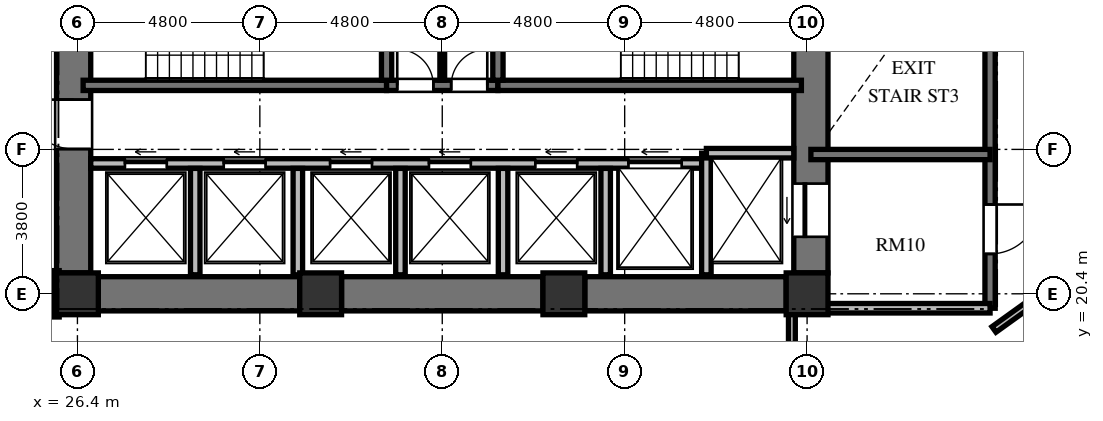
"""IFC4 building model, lengths in metres.
Left out: names, types, materials, properties, quantities, classifications, styles, units other than length and angle.
Written with IfcOpenShell. Run it as: python <this file> out.ifc"""

import sys

from ifc_helpers import new_model, si_unit, direction, frame, frame_2d, origin, origin_2d, place, context, subcontext, project, spatial, rectangle, extrude, element, fill, save


model = new_model("IFC4")
c1 = context("Model", 3, precision=1e-05, world=origin(), true_north=direction((0.0, 1.0)))
c2 = subcontext(c1, "Body", "Model", "MODEL_VIEW")
j1 = project(units=[si_unit("LENGTHUNIT", "METRE"), si_unit("PLANEANGLEUNIT", "RADIAN")], contexts=[c1])
p1 = place(None, origin())
s1 = spatial("IfcSite", under=j1, at=p1, CompositionType="ELEMENT")
p2 = place(p1, origin())
s2 = spatial("IfcBuilding", under=s1, at=p2, CompositionType="ELEMENT")
p3 = place(p2, frame((0.0, 0.0, 61.68)))
s3 = spatial("IfcBuildingStorey", under=s2, at=p3, CompositionType="ELEMENT", Elevation=61.68)
for number, where, z_axis, x_axis in (
    (1, (26.4, 20.4, 0.0), (0.0, 0.0, 1.0), (1.0, 0.0, 0.0)),
    (2, (32.8, 20.4, 0.0), (0.0, 0.0, 1.0), (1.0, 0.0, 0.0)),
    (3, (39.2, 20.4, 0.0), (0.0, 0.0, 1.0), (1.0, 0.0, 0.0)),
    (4, (45.6, 20.4, 0.0), (0.0, 0.0, 1.0), (1.0, 0.0, 0.0)),
):
    element("IfcColumn", number, at=place(p3, frame(where, z_axis=z_axis, x_axis=x_axis)), inside=s3, PredefinedType="COLUMN", context=c2, shape_type="SweptSolid", body=[
        extrude(rectangle(XDim=1.1, YDim=1.1, at=origin_2d()), origin(), (0.0, 0.0, 1.0), 3.648),
    ])
p4 = place(p3, frame((26.3, 20.95, 0.0), z_axis=(0.0, 0.0, 1.0), x_axis=(0.0, 1.0, 0.0)))
e5 = element("IfcWall", 5, at=p4, inside=s3, PredefinedType="SHEAR", context=c2, shape_type="SweptSolid", body=[
    extrude(rectangle(XDim=14.1, YDim=0.9, at=frame_2d((7.05, 0.0))), origin(), (0.0, 0.0, 1.0), 3.648),
])
p5 = place(p4, frame((6.5, 0.0, 0.0)))
e6 = element("IfcOpeningElement", 6, at=p5, cuts=e5, PredefinedType="OPENING", context=c2, shape_type="SweptSolid", body=[
    extrude(rectangle(XDim=1.2, YDim=2.15, at=frame_2d((0.6, 1.075))), frame((0.0, 0.46, 0.0), z_axis=(0.0, -1.0, 0.0), x_axis=(1.0, 0.0, 0.0)), (0.0, 0.0, 1.0), 0.92),
])
p6 = place(p4, frame((9.6, 0.0, 0.0)))
e7 = element("IfcOpeningElement", 7, at=p6, cuts=e5, PredefinedType="OPENING", context=c2, shape_type="SweptSolid", body=[
    extrude(rectangle(XDim=1.3, YDim=2.2, at=frame_2d((0.65, 1.1))), frame((0.0, 0.46, 0.0), z_axis=(0.0, -1.0, 0.0), x_axis=(1.0, 0.0, 0.0)), (0.0, 0.0, 1.0), 0.92),
])
p7 = place(p4, frame((3.26, 0.0, 0.0)))
e8 = element("IfcOpeningElement", 8, at=p7, cuts=e5, PredefinedType="OPENING", context=c2, shape_type="SweptSolid", body=[
    extrude(rectangle(XDim=1.3, YDim=2.2, at=frame_2d((0.65, 1.1))), frame((0.0, 0.46, 0.0), z_axis=(0.0, -1.0, 0.0), x_axis=(1.0, 0.0, 0.0)), (0.0, 0.0, 1.0), 0.92),
])
p8 = place(p3, frame((45.7, 20.95, 0.0), z_axis=(0.0, 0.0, 1.0), x_axis=(0.0, 1.0, 0.0)))
e9 = element("IfcWall", 9, at=p8, inside=s3, PredefinedType="SHEAR", context=c2, shape_type="SweptSolid", body=[
    extrude(rectangle(XDim=14.1, YDim=0.9, at=frame_2d((7.05, 0.0))), origin(), (0.0, 0.0, 1.0), 3.648),
])
p9 = place(p8, frame((11.75, 0.0, 0.0)))
e10 = element("IfcOpeningElement", 10, at=p9, cuts=e9, PredefinedType="OPENING", context=c2, shape_type="SweptSolid", body=[
    extrude(rectangle(XDim=1.4, YDim=2.3, at=frame_2d((0.7, 1.15))), frame((0.0, 0.46, 0.0), z_axis=(0.0, -1.0, 0.0), x_axis=(1.0, 0.0, 0.0)), (0.0, 0.0, 1.0), 0.92),
])
p10 = place(p8, frame((0.95, 0.0, 0.0)))
e11 = element("IfcOpeningElement", 11, at=p10, cuts=e9, PredefinedType="OPENING", context=c2, shape_type="SweptSolid", body=[
    extrude(rectangle(XDim=1.4, YDim=2.3, at=frame_2d((0.7, 1.15))), frame((0.0, 0.46, 0.0), z_axis=(0.0, -1.0, 0.0), x_axis=(1.0, 0.0, 0.0)), (0.0, 0.0, 1.0), 0.92),
])
p11 = place(p3, frame((26.95, 20.4, 0.0), z_axis=(0.0, 0.0, 1.0), x_axis=(1.0, 0.0, 0.0)))
e12 = element("IfcWall", 12, at=p11, inside=s3, PredefinedType="SHEAR", context=c2, shape_type="SweptSolid", body=[
    extrude(rectangle(XDim=5.3, YDim=0.9, at=frame_2d((2.65, 0.0))), origin(), (0.0, 0.0, 1.0), 3.648),
])
p12 = place(p3, frame((33.35, 20.4, 0.0), z_axis=(0.0, 0.0, 1.0), x_axis=(1.0, 0.0, 0.0)))
e13 = element("IfcWall", 13, at=p12, inside=s3, PredefinedType="SHEAR", context=c2, shape_type="SweptSolid", body=[
    extrude(rectangle(XDim=5.3, YDim=0.9, at=frame_2d((2.65, 0.0))), origin(), (0.0, 0.0, 1.0), 3.648),
])
p13 = place(p3, frame((39.75, 20.4, 0.0), z_axis=(0.0, 0.0, 1.0), x_axis=(1.0, 0.0, 0.0)))
e14 = element("IfcWall", 14, at=p13, inside=s3, PredefinedType="SHEAR", context=c2, shape_type="SweptSolid", body=[
    extrude(rectangle(XDim=5.3, YDim=0.9, at=frame_2d((2.65, 0.0))), origin(), (0.0, 0.0, 1.0), 3.648),
])
p14 = place(p3, frame((26.55, 25.885, 0.0), z_axis=(0.0, 0.0, 1.0), x_axis=(1.0, 0.0, 0.0)))
e15 = element("IfcWall", 15, at=p14, inside=s3, PredefinedType="SHEAR", context=c2, shape_type="SweptSolid", body=[
    extrude(rectangle(XDim=7.985, YDim=0.27, at=frame_2d((3.992, 0.0))), origin(), (0.0, 0.0, 1.0), 3.648),
])
p15 = place(p3, frame((34.535, 25.885, 0.0), z_axis=(0.0, 0.0, 1.0), x_axis=(1.0, 0.0, 0.0)))
e16 = element("IfcWall", 16, at=p15, inside=s3, PredefinedType="SHEAR", context=c2, shape_type="SweptSolid", body=[
    extrude(rectangle(XDim=2.93, YDim=0.27, at=frame_2d((1.465, 0.0))), origin(), (0.0, 0.0, 1.0), 3.648),
])
p16 = place(p15, frame((0.28, 0.0, 0.0)))
e17 = element("IfcOpeningElement", 17, at=p16, cuts=e16, PredefinedType="OPENING", context=c2, shape_type="SweptSolid", body=[
    extrude(rectangle(XDim=0.95, YDim=2.1, at=frame_2d((0.475, 1.05))), frame((0.0, 0.145, 0.0), z_axis=(0.0, -1.0, 0.0), x_axis=(1.0, 0.0, 0.0)), (0.0, 0.0, 1.0), 0.29),
])
p17 = place(p15, frame((1.7, 0.0, 0.0)))
e18 = element("IfcOpeningElement", 18, at=p17, cuts=e16, PredefinedType="OPENING", context=c2, shape_type="SweptSolid", body=[
    extrude(rectangle(XDim=0.95, YDim=2.1, at=frame_2d((0.475, 1.05))), frame((0.0, 0.145, 0.0), z_axis=(0.0, -1.0, 0.0), x_axis=(1.0, 0.0, 0.0)), (0.0, 0.0, 1.0), 0.29),
])
p18 = place(p3, frame((37.465, 25.885, 0.0), z_axis=(0.0, 0.0, 1.0), x_axis=(1.0, 0.0, 0.0)))
e19 = element("IfcWall", 19, at=p18, inside=s3, PredefinedType="SHEAR", context=c2, shape_type="SweptSolid", body=[
    extrude(rectangle(XDim=7.985, YDim=0.27, at=frame_2d((3.992, 0.0))), origin(), (0.0, 0.0, 1.0), 3.648),
])
for number, where, z_axis, x_axis in (
    (20, (34.535, 26.02, 0.0), (0.0, 0.0, 1.0), (0.0, 1.0, 0.0)),
    (21, (37.465, 26.02, 0.0), (0.0, 0.0, 1.0), (0.0, 1.0, 0.0)),
):
    element("IfcWall", number, at=place(p3, frame(where, z_axis=z_axis, x_axis=x_axis)), inside=s3, PredefinedType="SHEAR", context=c2, shape_type="SweptSolid", body=[
        extrude(rectangle(XDim=4.08, YDim=0.27, at=frame_2d((2.04, 0.0))), origin(), (0.0, 0.0, 1.0), 3.648),
    ])
p19 = place(p3, frame((36.0, 26.02, 0.0), z_axis=(0.0, 0.0, 1.0), x_axis=(0.0, 1.0, 0.0)))
e22 = element("IfcWall", 22, at=p19, inside=s3, PredefinedType="PARTITIONING", context=c2, shape_type="SweptSolid", body=[
    extrude(rectangle(XDim=4.08, YDim=0.125, at=frame_2d((2.04, 0.0))), origin(), (0.0, 0.0, 1.0), 3.428),
])
p20 = place(p3, frame((26.75, 23.83, 0.0), z_axis=(0.0, 0.0, 1.0), x_axis=(1.0, 0.0, 0.0)))
e23 = element("IfcWall", 23, at=p20, inside=s3, PredefinedType="SOLIDWALL", context=c2, shape_type="SweptSolid", body=[
    extrude(rectangle(XDim=16.2, YDim=0.25, at=frame_2d((8.1, 0.0))), origin(), (0.0, 0.0, 1.0), 3.428),
])
p21 = place(p20, frame((0.9, 0.0, 0.0)))
e24 = element("IfcOpeningElement", 24, at=p21, cuts=e23, PredefinedType="OPENING", context=c2, shape_type="SweptSolid", body=[
    extrude(rectangle(XDim=1.1, YDim=2.2, at=frame_2d((0.55, 1.1))), frame((0.0, 0.135, 0.0), z_axis=(0.0, -1.0, 0.0), x_axis=(1.0, 0.0, 0.0)), (0.0, 0.0, 1.0), 0.27),
])
p22 = place(p20, frame((3.5, 0.0, 0.0)))
e25 = element("IfcOpeningElement", 25, at=p22, cuts=e23, PredefinedType="OPENING", context=c2, shape_type="SweptSolid", body=[
    extrude(rectangle(XDim=1.1, YDim=2.2, at=frame_2d((0.55, 1.1))), frame((0.0, 0.135, 0.0), z_axis=(0.0, -1.0, 0.0), x_axis=(1.0, 0.0, 0.0)), (0.0, 0.0, 1.0), 0.27),
])
p23 = place(p20, frame((6.3, 0.0, 0.0)))
e26 = element("IfcOpeningElement", 26, at=p23, cuts=e23, PredefinedType="OPENING", context=c2, shape_type="SweptSolid", body=[
    extrude(rectangle(XDim=1.1, YDim=2.2, at=frame_2d((0.55, 1.1))), frame((0.0, 0.135, 0.0), z_axis=(0.0, -1.0, 0.0), x_axis=(1.0, 0.0, 0.0)), (0.0, 0.0, 1.0), 0.27),
])
p24 = place(p20, frame((8.9, 0.0, 0.0)))
e27 = element("IfcOpeningElement", 27, at=p24, cuts=e23, PredefinedType="OPENING", context=c2, shape_type="SweptSolid", body=[
    extrude(rectangle(XDim=1.1, YDim=2.2, at=frame_2d((0.55, 1.1))), frame((0.0, 0.135, 0.0), z_axis=(0.0, -1.0, 0.0), x_axis=(1.0, 0.0, 0.0)), (0.0, 0.0, 1.0), 0.27),
])
p25 = place(p20, frame((11.7, 0.0, 0.0)))
e28 = element("IfcOpeningElement", 28, at=p25, cuts=e23, PredefinedType="OPENING", context=c2, shape_type="SweptSolid", body=[
    extrude(rectangle(XDim=1.1, YDim=2.2, at=frame_2d((0.55, 1.1))), frame((0.0, 0.135, 0.0), z_axis=(0.0, -1.0, 0.0), x_axis=(1.0, 0.0, 0.0)), (0.0, 0.0, 1.0), 0.27),
])
p26 = place(p20, frame((14.15, 0.0, 0.0)))
e29 = element("IfcOpeningElement", 29, at=p26, cuts=e23, PredefinedType="OPENING", context=c2, shape_type="SweptSolid", body=[
    extrude(rectangle(XDim=1.4, YDim=2.3, at=frame_2d((0.7, 1.15))), frame((0.0, 0.135, 0.0), z_axis=(0.0, -1.0, 0.0), x_axis=(1.0, 0.0, 0.0)), (0.0, 0.0, 1.0), 0.27),
])
p27 = place(p3, frame((42.95, 20.9, 0.0), z_axis=(0.0, 0.0, 1.0), x_axis=(0.0, 1.0, 0.0)))
e30 = element("IfcWall", 30, at=p27, inside=s3, PredefinedType="SOLIDWALL", context=c2, shape_type="SweptSolid", body=[
    extrude(rectangle(XDim=3.2, YDim=0.25, at=frame_2d((1.6, 0.0))), origin(), (0.0, 0.0, 1.0), 3.428),
])
p28 = place(p3, frame((42.95, 24.1, 0.0), z_axis=(0.0, 0.0, 1.0), x_axis=(1.0, 0.0, 0.0)))
e31 = element("IfcWall", 31, at=p28, inside=s3, PredefinedType="SOLIDWALL", context=c2, shape_type="SweptSolid", body=[
    extrude(rectangle(XDim=2.3, YDim=0.25, at=frame_2d((1.15, 0.0))), origin(), (0.0, 0.0, 1.0), 3.428),
])
for number, where, z_axis, x_axis in (
    (32, (29.5, 20.9, 0.0), (0.0, 0.0, 1.0), (0.0, 1.0, 0.0)),
    (33, (32.2, 20.9, 0.0), (0.0, 0.0, 1.0), (0.0, 1.0, 0.0)),
    (34, (34.9, 20.9, 0.0), (0.0, 0.0, 1.0), (0.0, 1.0, 0.0)),
    (35, (37.6, 20.9, 0.0), (0.0, 0.0, 1.0), (0.0, 1.0, 0.0)),
    (36, (40.3, 20.9, 0.0), (0.0, 0.0, 1.0), (0.0, 1.0, 0.0)),
):
    element("IfcWall", number, at=place(p3, frame(where, z_axis=z_axis, x_axis=x_axis)), inside=s3, PredefinedType="SOLIDWALL", context=c2, shape_type="SweptSolid", body=[
        extrude(rectangle(XDim=2.8, YDim=0.25, at=frame_2d((1.4, 0.0))), origin(), (0.0, 0.0, 1.0), 3.428),
    ])
p29 = place(p3, frame((50.415, 35.845, 0.0), z_axis=(0.0, 0.0, 1.0), x_axis=(0.0, -1.0, 0.0)))
e37 = element("IfcWall", 37, at=p29, inside=s3, PredefinedType="SHEAR", context=c2, shape_type="SweptSolid", body=[
    extrude(rectangle(XDim=15.825, YDim=0.27, at=frame_2d((7.913, 0.0))), origin(), (0.0, 0.0, 1.0), 3.648),
])
p30 = place(p29, frame((4.445, 0.0, 0.0)))
e38 = element("IfcOpeningElement", 38, at=p30, cuts=e37, PredefinedType="OPENING", context=c2, shape_type="SweptSolid", body=[
    extrude(rectangle(XDim=1.2, YDim=2.15, at=frame_2d((0.6, 1.075))), frame((0.0, 0.145, 0.0), z_axis=(0.0, -1.0, 0.0), x_axis=(1.0, 0.0, 0.0)), (0.0, 0.0, 1.0), 0.29),
])
p31 = place(p29, frame((1.295, 0.0, 0.0)))
e39 = element("IfcOpeningElement", 39, at=p31, cuts=e37, PredefinedType="OPENING", context=c2, shape_type="SweptSolid", body=[
    extrude(rectangle(XDim=1.3, YDim=2.2, at=frame_2d((0.65, 1.1))), frame((0.0, 0.145, 0.0), z_axis=(0.0, -1.0, 0.0), x_axis=(1.0, 0.0, 0.0)), (0.0, 0.0, 1.0), 0.29),
])
p32 = place(p29, frame((13.095, 0.0, 0.0)))
e40 = element("IfcOpeningElement", 40, at=p32, cuts=e37, PredefinedType="OPENING", context=c2, shape_type="SweptSolid", body=[
    extrude(rectangle(XDim=1.3, YDim=2.2, at=frame_2d((0.65, 1.1))), frame((0.0, 0.145, 0.0), z_axis=(0.0, -1.0, 0.0), x_axis=(1.0, 0.0, 0.0)), (0.0, 0.0, 1.0), 0.29),
])
p33 = place(p3, frame((45.7, 24.065, 0.0), z_axis=(0.0, 0.0, 1.0), x_axis=(1.0, 0.0, 0.0)))
e41 = element("IfcWall", 41, at=p33, inside=s3, PredefinedType="SHEAR", context=c2, shape_type="SweptSolid", body=[
    extrude(rectangle(XDim=4.715, YDim=0.27, at=frame_2d((2.357, 0.0))), origin(), (0.0, 0.0, 1.0), 3.648),
])
p34 = place(p3, frame((45.7, 20.02, 0.0), z_axis=(0.0, 0.0, 1.0), x_axis=(1.0, 0.0, 0.0)))
e42 = element("IfcWall", 42, at=p34, inside=s3, PredefinedType="SOLIDWALL", context=c2, shape_type="SweptSolid", body=[
    extrude(rectangle(XDim=4.715, YDim=0.25, at=frame_2d((2.357, 0.0))), origin(), (0.0, 0.0, 1.0), 3.428),
])
p35 = place(p3, frame((53.183, 21.376, 0.0), z_axis=(0.0, 0.0, 1.0), x_axis=(-0.812151980909, -0.583445935717, 0.0)))
e43 = element("IfcWall", 43, at=p35, inside=s3, PredefinedType="PARTITIONING", context=c2, shape_type="SweptSolid", body=[
    extrude(rectangle(XDim=3.281, YDim=0.18, at=frame_2d((1.641, 0.0))), origin(), (0.0, 0.0, 1.0), 3.428),
])
p36 = place(p3, frame((25.83, 21.01, 0.0), z_axis=(0.0, 0.0, 1.0), x_axis=(0.0, -1.0, 0.0)))
e44 = element("IfcWall", 44, at=p36, inside=s3, PredefinedType="PARTITIONING", context=c2, shape_type="SweptSolid", body=[
    extrude(rectangle(XDim=1.22, YDim=0.18, at=frame_2d((0.61, 0.0))), origin(), (0.0, 0.0, 1.0), 3.428),
])
p37 = place(p3, frame((45.2, 19.91, 0.0), z_axis=(0.0, 0.0, 1.0), x_axis=(0.0, -1.0, 0.0)))
e45 = element("IfcWall", 45, at=p37, inside=s3, PredefinedType="PARTITIONING", context=c2, shape_type="SweptSolid", body=[
    extrude(rectangle(XDim=2.55, YDim=0.18, at=frame_2d((1.275, 0.0))), origin(), (0.0, 0.0, 1.0), 3.428),
])
p38 = place(p16, origin())
e46 = element("IfcDoor", 46, at=p38, inside=s3, OperationType="SINGLE_SWING_LEFT", PredefinedType="DOOR", context=c2, shape_type="SweptSolid", body=[
    extrude(rectangle(XDim=0.95, YDim=2.1, at=frame_2d((0.475, 1.05))), frame((0.0, 0.025, 0.0), z_axis=(0.0, -1.0, 0.0), x_axis=(1.0, 0.0, 0.0)), (0.0, 0.0, 1.0), 0.05),
])
fill(e17, e46)
p39 = place(p17, origin())
e47 = element("IfcDoor", 47, at=p39, inside=s3, OperationType="SINGLE_SWING_RIGHT", PredefinedType="DOOR", context=c2, shape_type="SweptSolid", body=[
    extrude(rectangle(XDim=0.95, YDim=2.1, at=frame_2d((0.475, 1.05))), frame((0.0, 0.025, 0.0), z_axis=(0.0, -1.0, 0.0), x_axis=(1.0, 0.0, 0.0)), (0.0, 0.0, 1.0), 0.05),
])
fill(e18, e47)
p40 = place(p7, origin())
e48 = element("IfcDoor", 48, at=p40, inside=s3, OperationType="SINGLE_SWING_RIGHT", PredefinedType="DOOR", context=c2, shape_type="SweptSolid", body=[
    extrude(rectangle(XDim=1.3, YDim=2.2, at=frame_2d((0.65, 1.1))), frame((0.0, 0.025, 0.0), z_axis=(0.0, -1.0, 0.0), x_axis=(1.0, 0.0, 0.0)), (0.0, 0.0, 1.0), 0.05),
])
fill(e8, e48)
p41 = place(p21, origin())
e49 = element("IfcDoor", 49, at=p41, inside=s3, OperationType="SLIDING_TO_LEFT", PredefinedType="DOOR", context=c2, shape_type="SweptSolid", body=[
    extrude(rectangle(XDim=1.1, YDim=2.2, at=frame_2d((0.55, 1.1))), frame((0.0, 0.025, 0.0), z_axis=(0.0, -1.0, 0.0), x_axis=(1.0, 0.0, 0.0)), (0.0, 0.0, 1.0), 0.05),
])
fill(e24, e49)
p42 = place(p22, origin())
e50 = element("IfcDoor", 50, at=p42, inside=s3, OperationType="SLIDING_TO_LEFT", PredefinedType="DOOR", context=c2, shape_type="SweptSolid", body=[
    extrude(rectangle(XDim=1.1, YDim=2.2, at=frame_2d((0.55, 1.1))), frame((0.0, 0.025, 0.0), z_axis=(0.0, -1.0, 0.0), x_axis=(1.0, 0.0, 0.0)), (0.0, 0.0, 1.0), 0.05),
])
fill(e25, e50)
p43 = place(p23, origin())
e51 = element("IfcDoor", 51, at=p43, inside=s3, OperationType="SLIDING_TO_LEFT", PredefinedType="DOOR", context=c2, shape_type="SweptSolid", body=[
    extrude(rectangle(XDim=1.1, YDim=2.2, at=frame_2d((0.55, 1.1))), frame((0.0, 0.025, 0.0), z_axis=(0.0, -1.0, 0.0), x_axis=(1.0, 0.0, 0.0)), (0.0, 0.0, 1.0), 0.05),
])
fill(e26, e51)
p44 = place(p24, origin())
e52 = element("IfcDoor", 52, at=p44, inside=s3, OperationType="SLIDING_TO_LEFT", PredefinedType="DOOR", context=c2, shape_type="SweptSolid", body=[
    extrude(rectangle(XDim=1.1, YDim=2.2, at=frame_2d((0.55, 1.1))), frame((0.0, 0.025, 0.0), z_axis=(0.0, -1.0, 0.0), x_axis=(1.0, 0.0, 0.0)), (0.0, 0.0, 1.0), 0.05),
])
fill(e27, e52)
p45 = place(p25, origin())
e53 = element("IfcDoor", 53, at=p45, inside=s3, OperationType="SLIDING_TO_LEFT", PredefinedType="DOOR", context=c2, shape_type="SweptSolid", body=[
    extrude(rectangle(XDim=1.1, YDim=2.2, at=frame_2d((0.55, 1.1))), frame((0.0, 0.025, 0.0), z_axis=(0.0, -1.0, 0.0), x_axis=(1.0, 0.0, 0.0)), (0.0, 0.0, 1.0), 0.05),
])
fill(e28, e53)
p46 = place(p10, origin())
e54 = element("IfcDoor", 54, at=p46, inside=s3, OperationType="SLIDING_TO_LEFT", PredefinedType="DOOR", context=c2, shape_type="SweptSolid", body=[
    extrude(rectangle(XDim=1.4, YDim=2.3, at=frame_2d((0.7, 1.15))), frame((0.0, 0.025, 0.0), z_axis=(0.0, -1.0, 0.0), x_axis=(1.0, 0.0, 0.0)), (0.0, 0.0, 1.0), 0.05),
])
fill(e11, e54)
p47 = place(p26, origin())
e55 = element("IfcDoor", 55, at=p47, inside=s3, OperationType="SLIDING_TO_LEFT", PredefinedType="DOOR", context=c2, shape_type="SweptSolid", body=[
    extrude(rectangle(XDim=1.4, YDim=2.3, at=frame_2d((0.7, 1.15))), frame((0.0, 0.025, 0.0), z_axis=(0.0, -1.0, 0.0), x_axis=(1.0, 0.0, 0.0)), (0.0, 0.0, 1.0), 0.05),
])
fill(e29, e55)
p48 = place(p32, origin())
e56 = element("IfcDoor", 56, at=p48, inside=s3, OperationType="SINGLE_SWING_LEFT", PredefinedType="DOOR", context=c2, shape_type="SweptSolid", body=[
    extrude(rectangle(XDim=1.3, YDim=2.2, at=frame_2d((0.65, 1.1))), frame((0.0, 0.025, 0.0), z_axis=(0.0, -1.0, 0.0), x_axis=(1.0, 0.0, 0.0)), (0.0, 0.0, 1.0), 0.05),
])
fill(e40, e56)
save(model, sys.argv[1])
